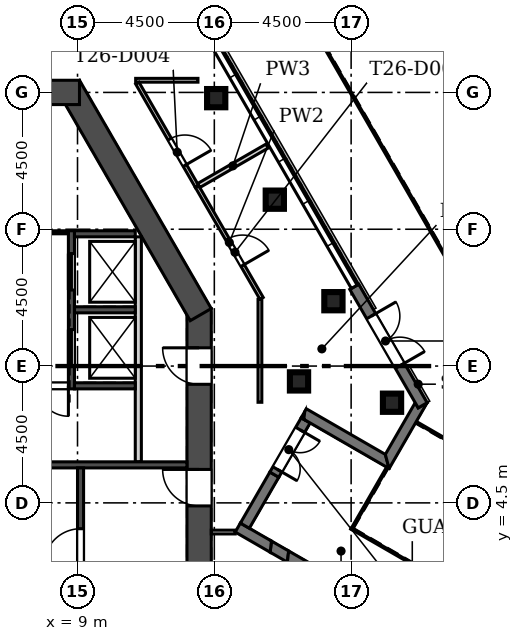
"""IFC4 building model, lengths in metres.
Left out: names, types, materials, properties, quantities, classifications, styles, units other than length and angle.
Written with IfcOpenShell. Run it as: python <this file> out.ifc"""

import sys

from ifc_helpers import new_model, si_unit, direction, frame, frame_2d, origin, origin_2d, place, context, subcontext, project, spatial, polyline, rectangle, hollow_rectangle, outline, extrude, element, fill, save


model = new_model("IFC4")
c1 = context("Model", 3, precision=1e-05, world=origin(), true_north=direction((0.0, 1.0)))
c2 = subcontext(c1, "Body", "Model", "MODEL_VIEW")
j1 = project(units=[si_unit("LENGTHUNIT", "METRE"), si_unit("PLANEANGLEUNIT", "RADIAN")], contexts=[c1])
p1 = place(None, origin())
s1 = spatial("IfcSite", under=j1, at=p1, CompositionType="ELEMENT")
p2 = place(p1, origin())
s2 = spatial("IfcBuilding", under=s1, at=p2, CompositionType="ELEMENT")
p3 = place(p2, frame((0.0, 0.0, 344.7)))
s3 = spatial("IfcBuildingStorey", under=s2, at=p3, CompositionType="ELEMENT", Elevation=344.7)
for number, where, z_axis, x_axis in (
    (1, (16.286, 8.495, 0.0), (0.0, 0.0, 1.0), (1.0, 0.0, 0.0)),
    (2, (19.345, 7.794, 0.0), (0.0, 0.0, 1.0), (1.0, 0.0, 0.0)),
    (3, (17.417, 11.133, 0.0), (0.0, 0.0, 1.0), (1.0, 0.0, 0.0)),
    (4, (15.49, 14.472, 0.0), (0.0, 0.0, 1.0), (1.0, 0.0, 0.0)),
    (5, (13.562, 17.812, 0.0), (0.0, 0.0, 1.0), (1.0, 0.0, 0.0)),
):
    element("IfcColumn", number, at=place(p3, frame(where, z_axis=z_axis, x_axis=x_axis)), inside=s3, PredefinedType="COLUMN", context=c2, shape_type="SweptSolid", body=[
        extrude(hollow_rectangle(XDim=0.6, YDim=0.6, WallThickness=0.03, at=origin_2d()), origin(), (0.0, 0.0, 1.0), 4.8),
    ])
p4 = place(p3, frame((13.0, 1.45, 0.0), z_axis=(0.0, 0.0, 1.0), x_axis=(0.0, 1.0, 0.0)))
e6 = element("IfcWall", 6, at=p4, inside=s3, PredefinedType="SHEAR", context=c2, shape_type="SweptSolid", body=[
    extrude(rectangle(XDim=9.442, YDim=0.8, at=frame_2d((4.721, 0.0))), origin(), (0.0, 0.0, 1.0), 4.8),
])
p5 = place(p4, frame((2.95, 0.0, 0.0)))
e7 = element("IfcOpeningElement", 7, at=p5, cuts=e6, PredefinedType="OPENING", context=c2, shape_type="SweptSolid", body=[
    extrude(rectangle(XDim=1.2, YDim=2.1, at=frame_2d((0.6, 1.05))), frame((0.0, 0.41, 0.0), z_axis=(0.0, -1.0, 0.0), x_axis=(1.0, 0.0, 0.0)), (0.0, 0.0, 1.0), 0.82),
])
p6 = place(p4, frame((6.95, 0.0, 0.0)))
e8 = element("IfcOpeningElement", 8, at=p6, cuts=e6, PredefinedType="OPENING", context=c2, shape_type="SweptSolid", body=[
    extrude(rectangle(XDim=1.2, YDim=2.1, at=frame_2d((0.6, 1.05))), frame((0.0, 0.41, 0.0), z_axis=(0.0, -1.0, 0.0), x_axis=(1.0, 0.0, 0.0)), (0.0, 0.0, 1.0), 0.82),
])
p7 = place(p3, frame((13.054, 10.692, 0.0), z_axis=(0.0, 0.0, 1.0), x_axis=(-0.500015780397, 0.866016292776, 0.0)))
e9 = element("IfcWall", 9, at=p7, inside=s3, PredefinedType="SHEAR", context=c2, shape_type="SweptSolid", body=[
    extrude(rectangle(XDim=8.67, YDim=0.8, at=frame_2d((4.335, 0.0))), origin(), (0.0, 0.0, 1.0), 4.8),
])
p8 = place(p3, frame((9.065, 18.0, 0.0), z_axis=(0.0, 0.0, 1.0), x_axis=(-1.0, 0.0, 0.0)))
e10 = element("IfcWall", 10, at=p8, inside=s3, PredefinedType="SHEAR", context=c2, shape_type="SweptSolid", body=[
    extrude(rectangle(XDim=18.13, YDim=0.8, at=frame_2d((9.065, 0.0))), origin(), (0.0, 0.0, 1.0), 4.8),
])
p9 = place(p8, frame((8.365, 0.0, 0.0)))
e11 = element("IfcOpeningElement", 11, at=p9, cuts=e10, PredefinedType="OPENING", context=c2, shape_type="SweptSolid", body=[
    extrude(rectangle(XDim=1.4, YDim=2.1, at=frame_2d((0.7, 1.05))), frame((0.0, 0.41, 0.0), z_axis=(0.0, -1.0, 0.0), x_axis=(1.0, 0.0, 0.0)), (0.0, 0.0, 1.0), 0.82),
])
p10 = place(p8, frame((11.065, 0.0, 0.0)))
e12 = element("IfcOpeningElement", 12, at=p10, cuts=e10, PredefinedType="OPENING", context=c2, shape_type="SweptSolid", body=[
    extrude(rectangle(XDim=6.0, YDim=2.4, at=frame_2d((3.0, 1.2))), frame((0.0, 0.41, 0.0), z_axis=(0.0, -1.0, 0.0), x_axis=(1.0, 0.0, 0.0)), (0.0, 0.0, 1.0), 0.82),
])
p11 = place(p8, frame((1.065, 0.0, 0.0)))
e13 = element("IfcOpeningElement", 13, at=p11, cuts=e10, PredefinedType="OPENING", context=c2, shape_type="SweptSolid", body=[
    extrude(rectangle(XDim=6.0, YDim=2.4, at=frame_2d((3.0, 1.2))), frame((0.0, 0.41, 0.0), z_axis=(0.0, -1.0, 0.0), x_axis=(1.0, 0.0, 0.0)), (0.0, 0.0, 1.0), 0.82),
])
p12 = place(p3, origin())
e14 = element("IfcWall", 14, at=p12, inside=s3, PredefinedType="SOLIDWALL", context=c2, shape_type="SweptSolid", body=[
    extrude(outline(polyline([(15.946, 2.919), (15.903, 2.549), (15.337, 2.876), (15.379, 3.246), (15.946, 2.919)])), origin(), (0.0, 0.0, 1.0), 3.9),
])
p13 = place(p3, origin())
e15 = element("IfcWall", 15, at=p13, inside=s3, PredefinedType="SOLIDWALL", context=c2, shape_type="SweptSolid", body=[
    extrude(outline(polyline([(14.357, 3.836), (14.652, 3.666), (15.379, 3.246), (15.337, 2.876), (14.187, 3.54), (14.357, 3.836)])), origin(), (0.0, 0.0, 1.0), 4.8),
])
p14 = place(p3, origin())
e16 = element("IfcWall", 16, at=p14, inside=s3, PredefinedType="SOLIDWALL", context=c2, shape_type="SweptSolid", body=[
    extrude(outline(polyline([(17.251, 2.165), (17.251, 2.165), (16.785, 2.04), (15.903, 2.549), (15.946, 2.919), (17.251, 2.165)])), origin(), (0.0, 0.0, 1.0), 4.8),
])
p15 = place(p3, frame((14.505, 3.75, 0.0), z_axis=(0.0, 0.0, 1.0), x_axis=(0.500027802648, 0.866009351323, 0.0)))
e17 = element("IfcWall", 17, at=p15, inside=s3, PredefinedType="SOLIDWALL", context=c2, shape_type="SweptSolid", body=[
    extrude(rectangle(XDim=1.938, YDim=0.34, at=frame_2d((0.969, 0.0))), origin(), (0.0, 0.0, 1.0), 4.8),
])
p16 = place(p3, frame((15.474, 5.428, 0.0), z_axis=(0.0, 0.0, 1.0), x_axis=(0.499971832445, 0.866041665719, 0.0)))
e18 = element("IfcWall", 18, at=p16, inside=s3, PredefinedType="SOLIDWALL", context=c2, shape_type="SweptSolid", body=[
    extrude(rectangle(XDim=2.062, YDim=0.34, at=frame_2d((1.031, 0.0))), origin(), (0.0, 0.0, 1.0), 3.9),
])
p17 = place(p16, frame((0.2, 0.0, 0.0)))
e19 = element("IfcOpeningElement", 19, at=p17, cuts=e18, PredefinedType="OPENING", context=c2, shape_type="SweptSolid", body=[
    extrude(rectangle(XDim=1.5, YDim=2.4, at=frame_2d((0.75, 1.2))), frame((0.0, 0.18, 0.0), z_axis=(0.0, -1.0, 0.0), x_axis=(1.0, 0.0, 0.0)), (0.0, 0.0, 1.0), 0.36),
])
p18 = place(p3, origin())
e20 = element("IfcWall", 20, at=p18, inside=s3, PredefinedType="SOLIDWALL", context=c2, shape_type="SweptSolid", body=[
    extrude(outline(polyline([(16.357, 7.299), (16.473, 7.501), (16.444, 7.248), (16.357, 7.299)])), origin(), (0.0, 0.0, 1.0), 3.9),
])
p19 = place(p3, origin())
e21 = element("IfcWall", 21, at=p19, inside=s3, PredefinedType="SOLIDWALL", context=c2, shape_type="SweptSolid", body=[
    extrude(outline(polyline([(16.652, 7.129), (16.444, 7.248), (16.473, 7.501), (16.527, 7.594), (19.126, 6.094), (19.251, 5.628), (19.25, 5.628), (16.652, 7.129)])), origin(), (0.0, 0.0, 1.0), 4.8),
])
p20 = place(p3, origin())
e22 = element("IfcWall", 22, at=p20, inside=s3, PredefinedType="SOLIDWALL", context=c2, shape_type="SweptSolid", body=[
    extrude(outline(polyline([(20.107, 7.795), (20.206, 7.625), (20.501, 7.795), (20.501, 7.795), (19.25, 5.628), (19.25, 5.628), (19.125, 6.094), (20.107, 7.795)])), origin(), (0.0, 0.0, 1.0), 4.8),
])
p21 = place(p3, frame((20.353, 7.709, 0.0), z_axis=(0.0, 0.0, 1.0), x_axis=(-0.499990139034, 0.866031096941, 0.0)))
e23 = element("IfcWall", 23, at=p21, inside=s3, PredefinedType="SOLIDWALL", context=c2, shape_type="SweptSolid", body=[
    extrude(rectangle(XDim=4.5, YDim=0.34, at=frame_2d((2.25, 0.0))), origin(), (0.0, 0.0, 1.0), 4.8),
])
p22 = place(p21, frame((1.5, 0.0, 0.0)))
e24 = element("IfcOpeningElement", 24, at=p22, cuts=e23, PredefinedType="OPENING", context=c2, shape_type="SweptSolid", body=[
    extrude(rectangle(XDim=1.885, YDim=2.6, at=frame_2d((0.942, 1.3))), frame((0.0, 0.18, 0.0), z_axis=(0.0, -1.0, 0.0), x_axis=(1.0, 0.0, 0.0)), (0.0, 0.0, 1.0), 0.36),
])
p23 = place(p3, frame((11.0, 5.85, 0.0), z_axis=(0.0, 0.0, 1.0), x_axis=(0.0, 1.0, 0.0)))
e25 = element("IfcWall", 25, at=p23, inside=s3, PredefinedType="SOLIDWALL", context=c2, shape_type="SweptSolid", body=[
    extrude(rectangle(XDim=7.4, YDim=0.2, at=frame_2d((3.7, 0.0))), origin(), (0.0, 0.0, 1.0), 4.8),
])
p24 = place(p3, frame((8.8, 8.25, -0.8), z_axis=(0.0, 0.0, 1.0), x_axis=(0.0, 1.0, 0.0)))
e26 = element("IfcWall", 26, at=p24, inside=s3, PredefinedType="SOLIDWALL", context=c2, shape_type="SweptSolid", body=[
    extrude(rectangle(XDim=5.2, YDim=0.2, at=frame_2d((2.6, 0.0))), origin(), (0.0, 0.0, 1.0), 5.6),
])
p25 = place(p24, frame((0.75, 0.0, 0.8)))
e27 = element("IfcOpeningElement", 27, at=p25, cuts=e26, PredefinedType="OPENING", context=c2, shape_type="SweptSolid", body=[
    extrude(rectangle(XDim=1.2, YDim=2.1, at=frame_2d((0.6, 1.05))), frame((0.0, 0.11, 0.0), z_axis=(0.0, -1.0, 0.0), x_axis=(1.0, 0.0, 0.0)), (0.0, 0.0, 1.0), 0.22),
])
p26 = place(p24, frame((3.25, 0.0, 0.8)))
e28 = element("IfcOpeningElement", 28, at=p26, cuts=e26, PredefinedType="OPENING", context=c2, shape_type="SweptSolid", body=[
    extrude(rectangle(XDim=1.2, YDim=2.1, at=frame_2d((0.6, 1.05))), frame((0.0, 0.11, 0.0), z_axis=(0.0, -1.0, 0.0), x_axis=(1.0, 0.0, 0.0)), (0.0, 0.0, 1.0), 0.22),
])
p27 = place(p3, frame((8.9, 8.35, -0.8), z_axis=(0.0, 0.0, 1.0), x_axis=(1.0, 0.0, 0.0)))
e29 = element("IfcWall", 29, at=p27, inside=s3, PredefinedType="SOLIDWALL", context=c2, shape_type="SweptSolid", body=[
    extrude(rectangle(XDim=2.0, YDim=0.2, at=frame_2d((1.0, 0.0))), origin(), (0.0, 0.0, 1.0), 5.6),
])
p28 = place(p3, frame((1.2, 5.75, -0.8), z_axis=(0.0, 0.0, 1.0), x_axis=(1.0, 0.0, 0.0)))
e30 = element("IfcWall", 30, at=p28, inside=s3, PredefinedType="SOLIDWALL", context=c2, shape_type="SweptSolid", body=[
    extrude(rectangle(XDim=11.4, YDim=0.2, at=frame_2d((5.7, 0.0))), origin(), (0.0, 0.0, 1.0), 5.6),
])
p29 = place(p3, frame((9.1, 2.25, -0.8), z_axis=(0.0, 0.0, 1.0), x_axis=(0.0, 1.0, 0.0)))
e31 = element("IfcWall", 31, at=p29, inside=s3, PredefinedType="SOLIDWALL", context=c2, shape_type="SweptSolid", body=[
    extrude(rectangle(XDim=3.4, YDim=0.2, at=frame_2d((1.7, 0.0))), origin(), (0.0, 0.0, 1.0), 5.6),
])
p30 = place(p29, frame((0.2, 0.0, 0.8)))
e32 = element("IfcOpeningElement", 32, at=p30, cuts=e31, PredefinedType="OPENING", context=c2, shape_type="SweptSolid", body=[
    extrude(rectangle(XDim=1.2, YDim=2.1, at=frame_2d((0.6, 1.05))), frame((0.0, 0.11, 0.0), z_axis=(0.0, -1.0, 0.0), x_axis=(1.0, 0.0, 0.0)), (0.0, 0.0, 1.0), 0.22),
])
for number, where, z_axis, x_axis in (
    (33, (8.9, 10.85, -0.8), (0.0, 0.0, 1.0), (1.0, 0.0, 0.0)),
    (34, (8.9, 13.35, -0.8), (0.0, 0.0, 1.0), (1.0, 0.0, 0.0)),
):
    element("IfcWall", number, at=place(p3, frame(where, z_axis=z_axis, x_axis=x_axis)), inside=s3, PredefinedType="SOLIDWALL", context=c2, shape_type="SweptSolid", body=[
        extrude(rectangle(XDim=2.0, YDim=0.2, at=frame_2d((1.0, 0.0))), origin(), (0.0, 0.0, 1.0), 5.6),
    ])
p31 = place(p3, frame((5.9, 13.4, 0.0), z_axis=(0.0, 0.0, 1.0), x_axis=(1.0, 0.0, 0.0)))
e35 = element("IfcWall", 35, at=p31, inside=s3, PredefinedType="PARTITIONING", context=c2, shape_type="SweptSolid", body=[
    extrude(rectangle(XDim=2.8, YDim=0.1, at=frame_2d((1.4, 0.0))), origin(), (0.0, 0.0, 1.0), 4.8),
])
p32 = place(p31, frame((0.7, 0.0, 0.0)))
e36 = element("IfcOpeningElement", 36, at=p32, cuts=e35, PredefinedType="OPENING", context=c2, shape_type="SweptSolid", body=[
    extrude(rectangle(XDim=1.4, YDim=2.1, at=frame_2d((0.7, 1.05))), frame((0.0, 0.06, 0.0), z_axis=(0.0, -1.0, 0.0), x_axis=(1.0, 0.0, 0.0)), (0.0, 0.0, 1.0), 0.12),
])
p33 = place(p3, frame((5.9, 8.35, 0.0), z_axis=(0.0, 0.0, 1.0), x_axis=(1.0, 0.0, 0.0)))
e37 = element("IfcWall", 37, at=p33, inside=s3, PredefinedType="SOLIDWALL", context=c2, shape_type="SweptSolid", body=[
    extrude(rectangle(XDim=2.8, YDim=0.2, at=frame_2d((1.4, 0.0))), origin(), (0.0, 0.0, 1.0), 4.8),
])
p34 = place(p33, frame((1.8, 0.0, 0.0)))
e38 = element("IfcOpeningElement", 38, at=p34, cuts=e37, PredefinedType="OPENING", context=c2, shape_type="SweptSolid", body=[
    extrude(rectangle(XDim=1.0, YDim=2.1, at=frame_2d((0.5, 1.05))), frame((0.0, 0.11, 0.0), z_axis=(0.0, -1.0, 0.0), x_axis=(1.0, 0.0, 0.0)), (0.0, 0.0, 1.0), 0.22),
])
p35 = place(p3, frame((12.962, 18.4, 0.0), z_axis=(0.0, 0.0, 1.0), x_axis=(-1.0, 0.0, 0.0)))
e39 = element("IfcWall", 39, at=p35, inside=s3, PredefinedType="PARTITIONING", context=c2, shape_type="SweptSolid", body=[
    extrude(rectangle(XDim=2.049, YDim=0.125, at=frame_2d((1.025, 0.0))), origin(), (0.0, 0.0, 1.0), 4.8),
])
p36 = place(p3, frame((10.967, 18.306, 0.0), z_axis=(0.0, 0.0, 1.0), x_axis=(0.499996894828, -0.866027196549, 0.0)))
e40 = element("IfcWall", 40, at=p36, inside=s3, PredefinedType="PARTITIONING", context=c2, shape_type="SweptSolid", body=[
    extrude(rectangle(XDim=3.927, YDim=0.125, at=frame_2d((1.964, 0.0))), origin(), (0.0, 0.0, 1.0), 4.8),
])
p37 = place(p36, frame((2.125, 0.0, 0.0)))
e41 = element("IfcOpeningElement", 41, at=p37, cuts=e40, PredefinedType="OPENING", context=c2, shape_type="SweptSolid", body=[
    extrude(rectangle(XDim=1.0, YDim=2.1, at=frame_2d((0.5, 1.05))), frame((0.0, 0.073, 0.0), z_axis=(0.0, -1.0, 0.0), x_axis=(1.0, 0.0, 0.0)), (0.0, 0.0, 1.0), 0.145),
])
p38 = place(p3, frame((14.188, 3.541, 0.0), z_axis=(0.0, 0.0, 1.0), x_axis=(-1.0, 0.0, 0.0)))
e42 = element("IfcWall", 42, at=p38, inside=s3, PredefinedType="PARTITIONING", context=c2, shape_type="SweptSolid", body=[
    extrude(rectangle(XDim=0.788, YDim=0.125, at=frame_2d((0.394, 0.0))), origin(), (0.0, 0.0, 1.0), 4.8),
])
p39 = place(p3, frame((12.931, 14.905, 0.0), z_axis=(0.0, 0.0, 1.0), x_axis=(0.499984515995, -0.866034343295, 0.0)))
e43 = element("IfcWall", 43, at=p39, inside=s3, PredefinedType="PARTITIONING", context=c2, shape_type="SweptSolid", body=[
    extrude(rectangle(XDim=4.247, YDim=0.125, at=frame_2d((2.124, 0.0))), origin(), (0.0, 0.0, 1.0), 4.8),
])
p40 = place(p39, frame((1.998, 0.0, 0.0)))
e44 = element("IfcOpeningElement", 44, at=p40, cuts=e43, PredefinedType="OPENING", context=c2, shape_type="SweptSolid", body=[
    extrude(rectangle(XDim=1.0, YDim=2.1, at=frame_2d((0.5, 1.05))), frame((0.0, 0.073, 0.0), z_axis=(0.0, -1.0, 0.0), x_axis=(1.0, 0.0, 0.0)), (0.0, 0.0, 1.0), 0.145),
])
p41 = place(p3, frame((15.0, 11.196, 0.0), z_axis=(0.0, 0.0, 1.0), x_axis=(0.0, -1.0, 0.0)))
e45 = element("IfcWall", 45, at=p41, inside=s3, PredefinedType="PARTITIONING", context=c2, shape_type="SweptSolid", body=[
    extrude(rectangle(XDim=3.387, YDim=0.125, at=frame_2d((1.693, 0.0))), origin(), (0.0, 0.0, 1.0), 4.8),
])
p42 = place(p3, frame((15.234, 16.235, 0.0), z_axis=(0.0, 0.0, 1.0), x_axis=(-0.866054111537, -0.499950273417, 0.0)))
e46 = element("IfcWall", 46, at=p42, inside=s3, PredefinedType="PARTITIONING", context=c2, shape_type="SweptSolid", body=[
    extrude(rectangle(XDim=2.597, YDim=0.15, at=frame_2d((1.299, 0.0))), origin(), (0.0, 0.0, 1.0), 4.8),
])
p43 = place(p17, frame((1.5, 0.0, 0.0), z_axis=(0.0, 0.0, 1.0), x_axis=(-1.0, 0.0, 0.0)))
e47 = element("IfcDoor", 47, at=p43, inside=s3, OperationType="DOUBLE_DOOR_SINGLE_SWING", PredefinedType="DOOR", context=c2, shape_type="SweptSolid", body=[
    extrude(rectangle(XDim=1.5, YDim=2.4, at=frame_2d((0.75, 1.2))), frame((0.0, 0.025, 0.0), z_axis=(0.0, -1.0, 0.0), x_axis=(1.0, 0.0, 0.0)), (0.0, 0.0, 1.0), 0.05),
])
fill(e19, e47)
p44 = place(p22, frame((1.885, 0.0, 0.0), z_axis=(0.0, 0.0, 1.0), x_axis=(-1.0, 0.0, 0.0)))
e48 = element("IfcDoor", 48, at=p44, inside=s3, OperationType="DOUBLE_DOOR_SINGLE_SWING", PredefinedType="DOOR", context=c2, shape_type="SweptSolid", body=[
    extrude(rectangle(XDim=1.885, YDim=2.6, at=frame_2d((0.942, 1.3))), frame((0.0, 0.025, 0.0), z_axis=(0.0, -1.0, 0.0), x_axis=(1.0, 0.0, 0.0)), (0.0, 0.0, 1.0), 0.05),
])
fill(e24, e48)
p45 = place(p25, origin())
e49 = element("IfcDoor", 49, at=p45, inside=s3, OperationType="SLIDING_TO_LEFT", PredefinedType="DOOR", context=c2, shape_type="SweptSolid", body=[
    extrude(rectangle(XDim=1.2, YDim=2.1, at=frame_2d((0.6, 1.05))), frame((0.0, 0.025, 0.0), z_axis=(0.0, -1.0, 0.0), x_axis=(1.0, 0.0, 0.0)), (0.0, 0.0, 1.0), 0.05),
])
fill(e27, e49)
p46 = place(p26, origin())
e50 = element("IfcDoor", 50, at=p46, inside=s3, OperationType="SLIDING_TO_LEFT", PredefinedType="DOOR", context=c2, shape_type="SweptSolid", body=[
    extrude(rectangle(XDim=1.2, YDim=2.1, at=frame_2d((0.6, 1.05))), frame((0.0, 0.025, 0.0), z_axis=(0.0, -1.0, 0.0), x_axis=(1.0, 0.0, 0.0)), (0.0, 0.0, 1.0), 0.05),
])
fill(e28, e50)
p47 = place(p34, frame((1.0, 0.0, 0.0), z_axis=(0.0, 0.0, 1.0), x_axis=(-1.0, 0.0, 0.0)))
e51 = element("IfcDoor", 51, at=p47, inside=s3, OperationType="SINGLE_SWING_LEFT", PredefinedType="DOOR", context=c2, shape_type="SweptSolid", body=[
    extrude(rectangle(XDim=1.0, YDim=2.1, at=frame_2d((0.5, 1.05))), frame((0.0, 0.025, 0.0), z_axis=(0.0, -1.0, 0.0), x_axis=(1.0, 0.0, 0.0)), (0.0, 0.0, 1.0), 0.05),
])
fill(e38, e51)
p48 = place(p5, origin())
e52 = element("IfcDoor", 52, at=p48, inside=s3, OperationType="SINGLE_SWING_RIGHT", PredefinedType="DOOR", context=c2, shape_type="SweptSolid", body=[
    extrude(rectangle(XDim=1.2, YDim=2.1, at=frame_2d((0.6, 1.05))), frame((0.0, 0.025, 0.0), z_axis=(0.0, -1.0, 0.0), x_axis=(1.0, 0.0, 0.0)), (0.0, 0.0, 1.0), 0.05),
])
fill(e7, e52)
p49 = place(p30, origin())
e53 = element("IfcDoor", 53, at=p49, inside=s3, OperationType="SINGLE_SWING_LEFT", PredefinedType="DOOR", context=c2, shape_type="SweptSolid", body=[
    extrude(rectangle(XDim=1.2, YDim=2.1, at=frame_2d((0.6, 1.05))), frame((0.0, 0.025, 0.0), z_axis=(0.0, -1.0, 0.0), x_axis=(1.0, 0.0, 0.0)), (0.0, 0.0, 1.0), 0.05),
])
fill(e32, e53)
p50 = place(p6, origin())
e54 = element("IfcDoor", 54, at=p50, inside=s3, OperationType="SINGLE_SWING_RIGHT", PredefinedType="DOOR", context=c2, shape_type="SweptSolid", body=[
    extrude(rectangle(XDim=1.2, YDim=2.1, at=frame_2d((0.6, 1.05))), frame((0.0, 0.025, 0.0), z_axis=(0.0, -1.0, 0.0), x_axis=(1.0, 0.0, 0.0)), (0.0, 0.0, 1.0), 0.05),
])
fill(e8, e54)
p51 = place(p37, origin())
e55 = element("IfcDoor", 55, at=p51, inside=s3, OperationType="SINGLE_SWING_RIGHT", PredefinedType="DOOR", context=c2, shape_type="SweptSolid", body=[
    extrude(rectangle(XDim=1.0, YDim=2.1, at=frame_2d((0.5, 1.05))), frame((0.0, 0.025, 0.0), z_axis=(0.0, -1.0, 0.0), x_axis=(1.0, 0.0, 0.0)), (0.0, 0.0, 1.0), 0.05),
])
fill(e41, e55)
p52 = place(p40, origin())
e56 = element("IfcDoor", 56, at=p52, inside=s3, OperationType="SINGLE_SWING_RIGHT", PredefinedType="DOOR", context=c2, shape_type="SweptSolid", body=[
    extrude(rectangle(XDim=1.0, YDim=2.1, at=frame_2d((0.5, 1.05))), frame((0.0, 0.025, 0.0), z_axis=(0.0, -1.0, 0.0), x_axis=(1.0, 0.0, 0.0)), (0.0, 0.0, 1.0), 0.05),
])
fill(e44, e56)
save(model, sys.argv[1])
